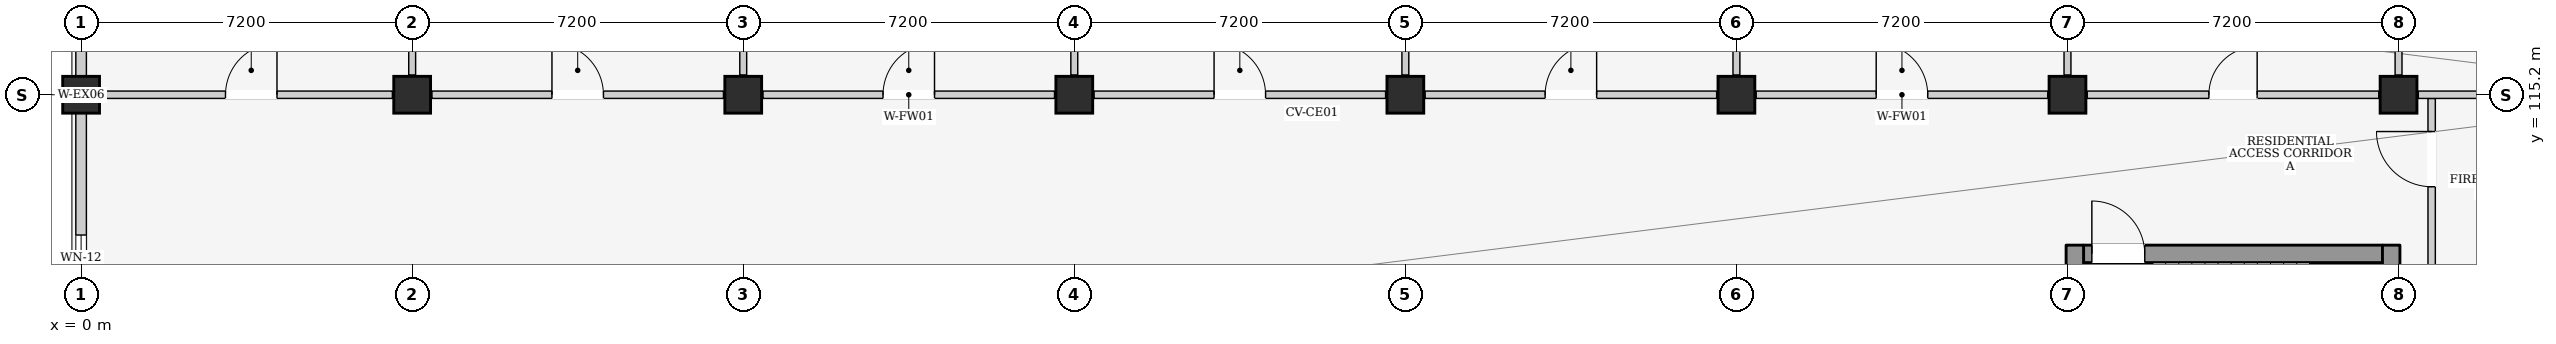
"""IFC4 building model, lengths in metres.
Left out: names, types, materials, properties, quantities, classifications, styles, units other than length and angle.
Written with IfcOpenShell. Run it as: python <this file> out.ifc"""

import sys

from ifc_helpers import new_model, si_unit, direction, frame, frame_2d, origin, origin_2d, place, context, subcontext, project, spatial, rectangle, extrude, element, fill, save


model = new_model("IFC4")
c1 = context("Model", 3, precision=1e-05, world=origin(), true_north=direction((0.0, 1.0)))
c2 = subcontext(c1, "Body", "Model", "MODEL_VIEW")
j1 = project(units=[si_unit("LENGTHUNIT", "METRE"), si_unit("PLANEANGLEUNIT", "RADIAN")], contexts=[c1])
p1 = place(None, origin())
s1 = spatial("IfcSite", under=j1, at=p1, CompositionType="ELEMENT")
p2 = place(p1, origin())
s2 = spatial("IfcBuilding", under=s1, at=p2, CompositionType="ELEMENT")
p3 = place(p2, origin())
s3 = spatial("IfcBuildingStorey", under=s2, at=p3, CompositionType="ELEMENT", Elevation=0.0)
for number, where, z_axis, x_axis in (
    (1, (0.0, 115.2, 0.0), (0.0, 0.0, 1.0), (1.0, 0.0, 0.0)),
    (2, (7.2, 115.2, 0.0), (0.0, 0.0, 1.0), (1.0, 0.0, 0.0)),
    (3, (14.4, 115.2, 0.0), (0.0, 0.0, 1.0), (1.0, 0.0, 0.0)),
    (4, (21.6, 115.2, 0.0), (0.0, 0.0, 1.0), (1.0, 0.0, 0.0)),
    (5, (28.8, 115.2, 0.0), (0.0, 0.0, 1.0), (1.0, 0.0, 0.0)),
    (6, (36.0, 115.2, 0.0), (0.0, 0.0, 1.0), (1.0, 0.0, 0.0)),
    (7, (43.2, 115.2, 0.0), (0.0, 0.0, 1.0), (1.0, 0.0, 0.0)),
    (8, (50.4, 115.2, 0.0), (0.0, 0.0, 1.0), (1.0, 0.0, 0.0)),
):
    element("IfcColumn", number, at=place(p3, frame(where, z_axis=z_axis, x_axis=x_axis)), inside=s3, PredefinedType="COLUMN", context=c2, shape_type="SweptSolid", body=[
        extrude(rectangle(XDim=0.8, YDim=0.8, at=origin_2d()), origin(), (0.0, 0.0, 1.0), 4.5),
    ])
p4 = place(p3, frame((0.0, 108.4, 0.0), z_axis=(0.0, 0.0, 1.0), x_axis=(0.0, 1.0, 0.0)))
e9 = element("IfcWall", 9, at=p4, inside=s3, PredefinedType="ELEMENTEDWALL", context=c2, shape_type="SweptSolid", body=[
    extrude(rectangle(XDim=6.4, YDim=0.23, at=frame_2d((3.2, 0.0))), origin(), (0.0, 0.0, 1.0), 3.665),
])
p5 = place(p4, frame((2.75, 0.0, 1.1)))
e10 = element("IfcOpeningElement", 10, at=p5, cuts=e9, PredefinedType="OPENING", context=c2, shape_type="SweptSolid", body=[
    extrude(rectangle(XDim=1.0, YDim=0.9, at=frame_2d((0.5, 0.45))), frame((0.0, 0.13, 0.0), z_axis=(0.0, -1.0, 0.0), x_axis=(1.0, 0.0, 0.0)), (0.0, 0.0, 1.0), 0.26),
])
p6 = place(p3, frame((0.0, 115.6, 0.0), z_axis=(0.0, 0.0, 1.0), x_axis=(0.0, 1.0, 0.0)))
e11 = element("IfcWall", 11, at=p6, inside=s3, PredefinedType="ELEMENTEDWALL", context=c2, shape_type="SweptSolid", body=[
    extrude(rectangle(XDim=6.4, YDim=0.23, at=frame_2d((3.2, 0.0))), origin(), (0.0, 0.0, 1.0), 3.665),
])
p7 = place(p6, frame((2.75, 0.0, 1.1)))
e12 = element("IfcOpeningElement", 12, at=p7, cuts=e11, PredefinedType="OPENING", context=c2, shape_type="SweptSolid", body=[
    extrude(rectangle(XDim=1.0, YDim=0.9, at=frame_2d((0.5, 0.45))), frame((0.0, 0.13, 0.0), z_axis=(0.0, -1.0, 0.0), x_axis=(1.0, 0.0, 0.0)), (0.0, 0.0, 1.0), 0.26),
])
p8 = place(p3, frame((43.55, 111.74, 0.0), z_axis=(0.0, 0.0, 1.0), x_axis=(1.0, 0.0, 0.0)))
e13 = element("IfcWall", 13, at=p8, inside=s3, PredefinedType="SHEAR", context=c2, shape_type="SweptSolid", body=[
    extrude(rectangle(XDim=6.5, YDim=0.38, at=frame_2d((3.25, 0.0))), origin(), (0.0, 0.0, 1.0), 4.2),
])
p9 = place(p8, frame((0.18, 0.0, 0.0)))
e14 = element("IfcOpeningElement", 14, at=p9, cuts=e13, PredefinedType="OPENING", context=c2, shape_type="SweptSolid", body=[
    extrude(rectangle(XDim=1.15, YDim=2.2, at=frame_2d((0.575, 1.1))), frame((0.0, 0.205, 0.0), z_axis=(0.0, -1.0, 0.0), x_axis=(1.0, 0.0, 0.0)), (0.0, 0.0, 1.0), 0.41),
])
for number, where, z_axis, x_axis in (
    (15, (43.36, 108.07, 0.0), (0.0, 0.0, 1.0), (0.0, 1.0, 0.0)),
    (16, (50.24, 108.07, 0.0), (0.0, 0.0, 1.0), (0.0, 1.0, 0.0)),
):
    element("IfcWall", number, at=place(p3, frame(where, z_axis=z_axis, x_axis=x_axis)), inside=s3, PredefinedType="SHEAR", context=c2, shape_type="SweptSolid", body=[
        extrude(rectangle(XDim=3.86, YDim=0.38, at=frame_2d((1.93, 0.0))), origin(), (0.0, 0.0, 1.0), 4.2),
    ])
p10 = place(p3, frame((51.12, 111.1, 0.0), z_axis=(0.0, 0.0, 1.0), x_axis=(0.0, 1.0, 0.0)))
e17 = element("IfcWall", 17, at=p10, inside=s3, PredefinedType="PARTITIONING", context=c2, shape_type="SweptSolid", body=[
    extrude(rectangle(XDim=4.02, YDim=0.16, at=frame_2d((2.01, 0.0))), origin(), (0.0, 0.0, 1.0), 4.2),
])
p11 = place(p10, frame((2.1, 0.0, 0.0)))
e18 = element("IfcOpeningElement", 18, at=p11, cuts=e17, PredefinedType="OPENING", context=c2, shape_type="SweptSolid", body=[
    extrude(rectangle(XDim=1.2, YDim=2.2, at=frame_2d((0.6, 1.1))), frame((0.0, 0.095, 0.0), z_axis=(0.0, -1.0, 0.0), x_axis=(1.0, 0.0, 0.0)), (0.0, 0.0, 1.0), 0.19),
])
p12 = place(p3, frame((0.43, 115.2, 0.0), z_axis=(0.0, 0.0, 1.0), x_axis=(1.0, 0.0, 0.0)))
e19 = element("IfcWall", 19, at=p12, inside=s3, PredefinedType="PARTITIONING", context=c2, shape_type="SweptSolid", body=[
    extrude(rectangle(XDim=6.34, YDim=0.16, at=frame_2d((3.17, 0.0))), origin(), (0.0, 0.0, 1.0), 3.435),
])
p13 = place(p12, frame((2.71, 0.0, 0.0)))
e20 = element("IfcOpeningElement", 20, at=p13, cuts=e19, PredefinedType="OPENING", context=c2, shape_type="SweptSolid", body=[
    extrude(rectangle(XDim=1.12, YDim=2.2, at=frame_2d((0.56, 1.1))), frame((0.0, 0.095, 0.0), z_axis=(0.0, -1.0, 0.0), x_axis=(1.0, 0.0, 0.0)), (0.0, 0.0, 1.0), 0.19),
])
p14 = place(p3, frame((7.2, 115.63, 0.0), z_axis=(0.0, 0.0, 1.0), x_axis=(0.0, 1.0, 0.0)))
e21 = element("IfcWall", 21, at=p14, inside=s3, PredefinedType="PARTITIONING", context=c2, shape_type="SweptSolid", body=[
    extrude(rectangle(XDim=6.34, YDim=0.15, at=frame_2d((3.17, 0.0))), origin(), (0.0, 0.0, 1.0), 3.435),
])
p15 = place(p3, frame((7.63, 115.2, 0.0), z_axis=(0.0, 0.0, 1.0), x_axis=(1.0, 0.0, 0.0)))
e22 = element("IfcWall", 22, at=p15, inside=s3, PredefinedType="PARTITIONING", context=c2, shape_type="SweptSolid", body=[
    extrude(rectangle(XDim=6.34, YDim=0.16, at=frame_2d((3.17, 0.0))), origin(), (0.0, 0.0, 1.0), 3.435),
])
p16 = place(p15, frame((2.61, 0.0, 0.0)))
e23 = element("IfcOpeningElement", 23, at=p16, cuts=e22, PredefinedType="OPENING", context=c2, shape_type="SweptSolid", body=[
    extrude(rectangle(XDim=1.12, YDim=2.2, at=frame_2d((0.56, 1.1))), frame((0.0, 0.095, 0.0), z_axis=(0.0, -1.0, 0.0), x_axis=(1.0, 0.0, 0.0)), (0.0, 0.0, 1.0), 0.19),
])
p17 = place(p3, frame((14.4, 115.63, 0.0), z_axis=(0.0, 0.0, 1.0), x_axis=(0.0, 1.0, 0.0)))
e24 = element("IfcWall", 24, at=p17, inside=s3, PredefinedType="PARTITIONING", context=c2, shape_type="SweptSolid", body=[
    extrude(rectangle(XDim=6.34, YDim=0.15, at=frame_2d((3.17, 0.0))), origin(), (0.0, 0.0, 1.0), 3.435),
])
p18 = place(p3, frame((14.83, 115.2, 0.0), z_axis=(0.0, 0.0, 1.0), x_axis=(1.0, 0.0, 0.0)))
e25 = element("IfcWall", 25, at=p18, inside=s3, PredefinedType="PARTITIONING", context=c2, shape_type="SweptSolid", body=[
    extrude(rectangle(XDim=6.34, YDim=0.16, at=frame_2d((3.17, 0.0))), origin(), (0.0, 0.0, 1.0), 3.435),
])
p19 = place(p18, frame((2.61, 0.0, 0.0)))
e26 = element("IfcOpeningElement", 26, at=p19, cuts=e25, PredefinedType="OPENING", context=c2, shape_type="SweptSolid", body=[
    extrude(rectangle(XDim=1.12, YDim=2.2, at=frame_2d((0.56, 1.1))), frame((0.0, 0.095, 0.0), z_axis=(0.0, -1.0, 0.0), x_axis=(1.0, 0.0, 0.0)), (0.0, 0.0, 1.0), 0.19),
])
p20 = place(p3, frame((21.6, 115.63, 0.0), z_axis=(0.0, 0.0, 1.0), x_axis=(0.0, 1.0, 0.0)))
e27 = element("IfcWall", 27, at=p20, inside=s3, PredefinedType="PARTITIONING", context=c2, shape_type="SweptSolid", body=[
    extrude(rectangle(XDim=6.34, YDim=0.15, at=frame_2d((3.17, 0.0))), origin(), (0.0, 0.0, 1.0), 3.435),
])
p21 = place(p3, frame((22.03, 115.2, 0.0), z_axis=(0.0, 0.0, 1.0), x_axis=(1.0, 0.0, 0.0)))
e28 = element("IfcWall", 28, at=p21, inside=s3, PredefinedType="PARTITIONING", context=c2, shape_type="SweptSolid", body=[
    extrude(rectangle(XDim=6.34, YDim=0.16, at=frame_2d((3.17, 0.0))), origin(), (0.0, 0.0, 1.0), 3.435),
])
p22 = place(p21, frame((2.61, 0.0, 0.0)))
e29 = element("IfcOpeningElement", 29, at=p22, cuts=e28, PredefinedType="OPENING", context=c2, shape_type="SweptSolid", body=[
    extrude(rectangle(XDim=1.12, YDim=2.2, at=frame_2d((0.56, 1.1))), frame((0.0, 0.095, 0.0), z_axis=(0.0, -1.0, 0.0), x_axis=(1.0, 0.0, 0.0)), (0.0, 0.0, 1.0), 0.19),
])
p23 = place(p3, frame((28.8, 115.63, 0.0), z_axis=(0.0, 0.0, 1.0), x_axis=(0.0, 1.0, 0.0)))
e30 = element("IfcWall", 30, at=p23, inside=s3, PredefinedType="PARTITIONING", context=c2, shape_type="SweptSolid", body=[
    extrude(rectangle(XDim=6.34, YDim=0.15, at=frame_2d((3.17, 0.0))), origin(), (0.0, 0.0, 1.0), 3.435),
])
p24 = place(p3, frame((29.23, 115.2, 0.0), z_axis=(0.0, 0.0, 1.0), x_axis=(1.0, 0.0, 0.0)))
e31 = element("IfcWall", 31, at=p24, inside=s3, PredefinedType="PARTITIONING", context=c2, shape_type="SweptSolid", body=[
    extrude(rectangle(XDim=6.34, YDim=0.16, at=frame_2d((3.17, 0.0))), origin(), (0.0, 0.0, 1.0), 3.435),
])
p25 = place(p24, frame((2.61, 0.0, 0.0)))
e32 = element("IfcOpeningElement", 32, at=p25, cuts=e31, PredefinedType="OPENING", context=c2, shape_type="SweptSolid", body=[
    extrude(rectangle(XDim=1.12, YDim=2.2, at=frame_2d((0.56, 1.1))), frame((0.0, 0.095, 0.0), z_axis=(0.0, -1.0, 0.0), x_axis=(1.0, 0.0, 0.0)), (0.0, 0.0, 1.0), 0.19),
])
p26 = place(p3, frame((36.0, 115.63, 0.0), z_axis=(0.0, 0.0, 1.0), x_axis=(0.0, 1.0, 0.0)))
e33 = element("IfcWall", 33, at=p26, inside=s3, PredefinedType="PARTITIONING", context=c2, shape_type="SweptSolid", body=[
    extrude(rectangle(XDim=6.34, YDim=0.15, at=frame_2d((3.17, 0.0))), origin(), (0.0, 0.0, 1.0), 3.435),
])
p27 = place(p3, frame((36.43, 115.2, 0.0), z_axis=(0.0, 0.0, 1.0), x_axis=(1.0, 0.0, 0.0)))
e34 = element("IfcWall", 34, at=p27, inside=s3, PredefinedType="PARTITIONING", context=c2, shape_type="SweptSolid", body=[
    extrude(rectangle(XDim=6.34, YDim=0.16, at=frame_2d((3.17, 0.0))), origin(), (0.0, 0.0, 1.0), 3.435),
])
p28 = place(p27, frame((2.61, 0.0, 0.0)))
e35 = element("IfcOpeningElement", 35, at=p28, cuts=e34, PredefinedType="OPENING", context=c2, shape_type="SweptSolid", body=[
    extrude(rectangle(XDim=1.12, YDim=2.2, at=frame_2d((0.56, 1.1))), frame((0.0, 0.095, 0.0), z_axis=(0.0, -1.0, 0.0), x_axis=(1.0, 0.0, 0.0)), (0.0, 0.0, 1.0), 0.19),
])
p29 = place(p3, frame((43.2, 115.63, 0.0), z_axis=(0.0, 0.0, 1.0), x_axis=(0.0, 1.0, 0.0)))
e36 = element("IfcWall", 36, at=p29, inside=s3, PredefinedType="PARTITIONING", context=c2, shape_type="SweptSolid", body=[
    extrude(rectangle(XDim=6.34, YDim=0.15, at=frame_2d((3.17, 0.0))), origin(), (0.0, 0.0, 1.0), 3.435),
])
p30 = place(p3, frame((43.63, 115.2, 0.0), z_axis=(0.0, 0.0, 1.0), x_axis=(1.0, 0.0, 0.0)))
e37 = element("IfcWall", 37, at=p30, inside=s3, PredefinedType="PARTITIONING", context=c2, shape_type="SweptSolid", body=[
    extrude(rectangle(XDim=6.34, YDim=0.16, at=frame_2d((3.17, 0.0))), origin(), (0.0, 0.0, 1.0), 3.435),
])
p31 = place(p30, frame((2.645, 0.0, 0.0)))
e38 = element("IfcOpeningElement", 38, at=p31, cuts=e37, PredefinedType="OPENING", context=c2, shape_type="SweptSolid", body=[
    extrude(rectangle(XDim=1.05, YDim=2.15, at=frame_2d((0.525, 1.075))), frame((0.0, 0.095, 0.0), z_axis=(0.0, -1.0, 0.0), x_axis=(1.0, 0.0, 0.0)), (0.0, 0.0, 1.0), 0.19),
])
p32 = place(p3, frame((50.4, 115.63, 0.0), z_axis=(0.0, 0.0, 1.0), x_axis=(0.0, 1.0, 0.0)))
e39 = element("IfcWall", 39, at=p32, inside=s3, PredefinedType="PARTITIONING", context=c2, shape_type="SweptSolid", body=[
    extrude(rectangle(XDim=6.34, YDim=0.15, at=frame_2d((3.17, 0.0))), origin(), (0.0, 0.0, 1.0), 3.435),
])
p33 = place(p3, frame((50.83, 115.2, 0.0), z_axis=(0.0, 0.0, 1.0), x_axis=(1.0, 0.0, 0.0)))
e40 = element("IfcWall", 40, at=p33, inside=s3, PredefinedType="PARTITIONING", context=c2, shape_type="SweptSolid", body=[
    extrude(rectangle(XDim=6.34, YDim=0.16, at=frame_2d((3.17, 0.0))), origin(), (0.0, 0.0, 1.0), 3.435),
])
p34 = place(p33, frame((2.645, 0.0, 0.0)))
e41 = element("IfcOpeningElement", 41, at=p34, cuts=e40, PredefinedType="OPENING", context=c2, shape_type="SweptSolid", body=[
    extrude(rectangle(XDim=1.05, YDim=2.15, at=frame_2d((0.525, 1.075))), frame((0.0, 0.095, 0.0), z_axis=(0.0, -1.0, 0.0), x_axis=(1.0, 0.0, 0.0)), (0.0, 0.0, 1.0), 0.19),
])
p35 = place(p5, origin())
e42 = element("IfcWindow", 42, at=p35, inside=s3, PartitioningType="SINGLE_PANEL", PredefinedType="WINDOW", context=c2, shape_type="SweptSolid", body=[
    extrude(rectangle(XDim=1.0, YDim=0.9, at=frame_2d((0.5, 0.45))), frame((0.0, 0.03, 0.0), z_axis=(0.0, -1.0, 0.0), x_axis=(1.0, 0.0, 0.0)), (0.0, 0.0, 1.0), 0.06),
])
fill(e10, e42)
p36 = place(p9, origin())
e43 = element("IfcDoor", 43, at=p36, inside=s3, OperationType="SINGLE_SWING_LEFT", PredefinedType="DOOR", context=c2, shape_type="SweptSolid", body=[
    extrude(rectangle(XDim=1.15, YDim=2.2, at=frame_2d((0.575, 1.1))), frame((0.0, 0.025, 0.0), z_axis=(0.0, -1.0, 0.0), x_axis=(1.0, 0.0, 0.0)), (0.0, 0.0, 1.0), 0.05),
])
fill(e14, e43)
p37 = place(p11, origin())
e44 = element("IfcDoor", 44, at=p37, inside=s3, OperationType="SINGLE_SWING_RIGHT", PredefinedType="DOOR", context=c2, shape_type="SweptSolid", body=[
    extrude(rectangle(XDim=1.2, YDim=2.2, at=frame_2d((0.6, 1.1))), frame((0.0, 0.025, 0.0), z_axis=(0.0, -1.0, 0.0), x_axis=(1.0, 0.0, 0.0)), (0.0, 0.0, 1.0), 0.05),
])
fill(e18, e44)
p38 = place(p13, origin())
e45 = element("IfcDoor", 45, at=p38, inside=s3, OperationType="SINGLE_SWING_RIGHT", PredefinedType="DOOR", context=c2, shape_type="SweptSolid", body=[
    extrude(rectangle(XDim=1.12, YDim=2.2, at=frame_2d((0.56, 1.1))), frame((0.0, 0.025, 0.0), z_axis=(0.0, -1.0, 0.0), x_axis=(1.0, 0.0, 0.0)), (0.0, 0.0, 1.0), 0.05),
])
fill(e20, e45)
p39 = place(p16, origin())
e46 = element("IfcDoor", 46, at=p39, inside=s3, OperationType="SINGLE_SWING_LEFT", PredefinedType="DOOR", context=c2, shape_type="SweptSolid", body=[
    extrude(rectangle(XDim=1.12, YDim=2.2, at=frame_2d((0.56, 1.1))), frame((0.0, 0.025, 0.0), z_axis=(0.0, -1.0, 0.0), x_axis=(1.0, 0.0, 0.0)), (0.0, 0.0, 1.0), 0.05),
])
fill(e23, e46)
p40 = place(p19, origin())
e47 = element("IfcDoor", 47, at=p40, inside=s3, OperationType="SINGLE_SWING_RIGHT", PredefinedType="DOOR", context=c2, shape_type="SweptSolid", body=[
    extrude(rectangle(XDim=1.12, YDim=2.2, at=frame_2d((0.56, 1.1))), frame((0.0, 0.025, 0.0), z_axis=(0.0, -1.0, 0.0), x_axis=(1.0, 0.0, 0.0)), (0.0, 0.0, 1.0), 0.05),
])
fill(e26, e47)
p41 = place(p22, origin())
e48 = element("IfcDoor", 48, at=p41, inside=s3, OperationType="SINGLE_SWING_LEFT", PredefinedType="DOOR", context=c2, shape_type="SweptSolid", body=[
    extrude(rectangle(XDim=1.12, YDim=2.2, at=frame_2d((0.56, 1.1))), frame((0.0, 0.025, 0.0), z_axis=(0.0, -1.0, 0.0), x_axis=(1.0, 0.0, 0.0)), (0.0, 0.0, 1.0), 0.05),
])
fill(e29, e48)
p42 = place(p25, origin())
e49 = element("IfcDoor", 49, at=p42, inside=s3, OperationType="SINGLE_SWING_RIGHT", PredefinedType="DOOR", context=c2, shape_type="SweptSolid", body=[
    extrude(rectangle(XDim=1.12, YDim=2.2, at=frame_2d((0.56, 1.1))), frame((0.0, 0.025, 0.0), z_axis=(0.0, -1.0, 0.0), x_axis=(1.0, 0.0, 0.0)), (0.0, 0.0, 1.0), 0.05),
])
fill(e32, e49)
p43 = place(p28, origin())
e50 = element("IfcDoor", 50, at=p43, inside=s3, OperationType="SINGLE_SWING_LEFT", PredefinedType="DOOR", context=c2, shape_type="SweptSolid", body=[
    extrude(rectangle(XDim=1.12, YDim=2.2, at=frame_2d((0.56, 1.1))), frame((0.0, 0.025, 0.0), z_axis=(0.0, -1.0, 0.0), x_axis=(1.0, 0.0, 0.0)), (0.0, 0.0, 1.0), 0.05),
])
fill(e35, e50)
p44 = place(p31, origin())
e51 = element("IfcDoor", 51, at=p44, inside=s3, OperationType="SINGLE_SWING_RIGHT", PredefinedType="DOOR", context=c2, shape_type="SweptSolid", body=[
    extrude(rectangle(XDim=1.05, YDim=2.15, at=frame_2d((0.525, 1.075))), frame((0.0, 0.025, 0.0), z_axis=(0.0, -1.0, 0.0), x_axis=(1.0, 0.0, 0.0)), (0.0, 0.0, 1.0), 0.05),
])
fill(e38, e51)
save(model, sys.argv[1])
